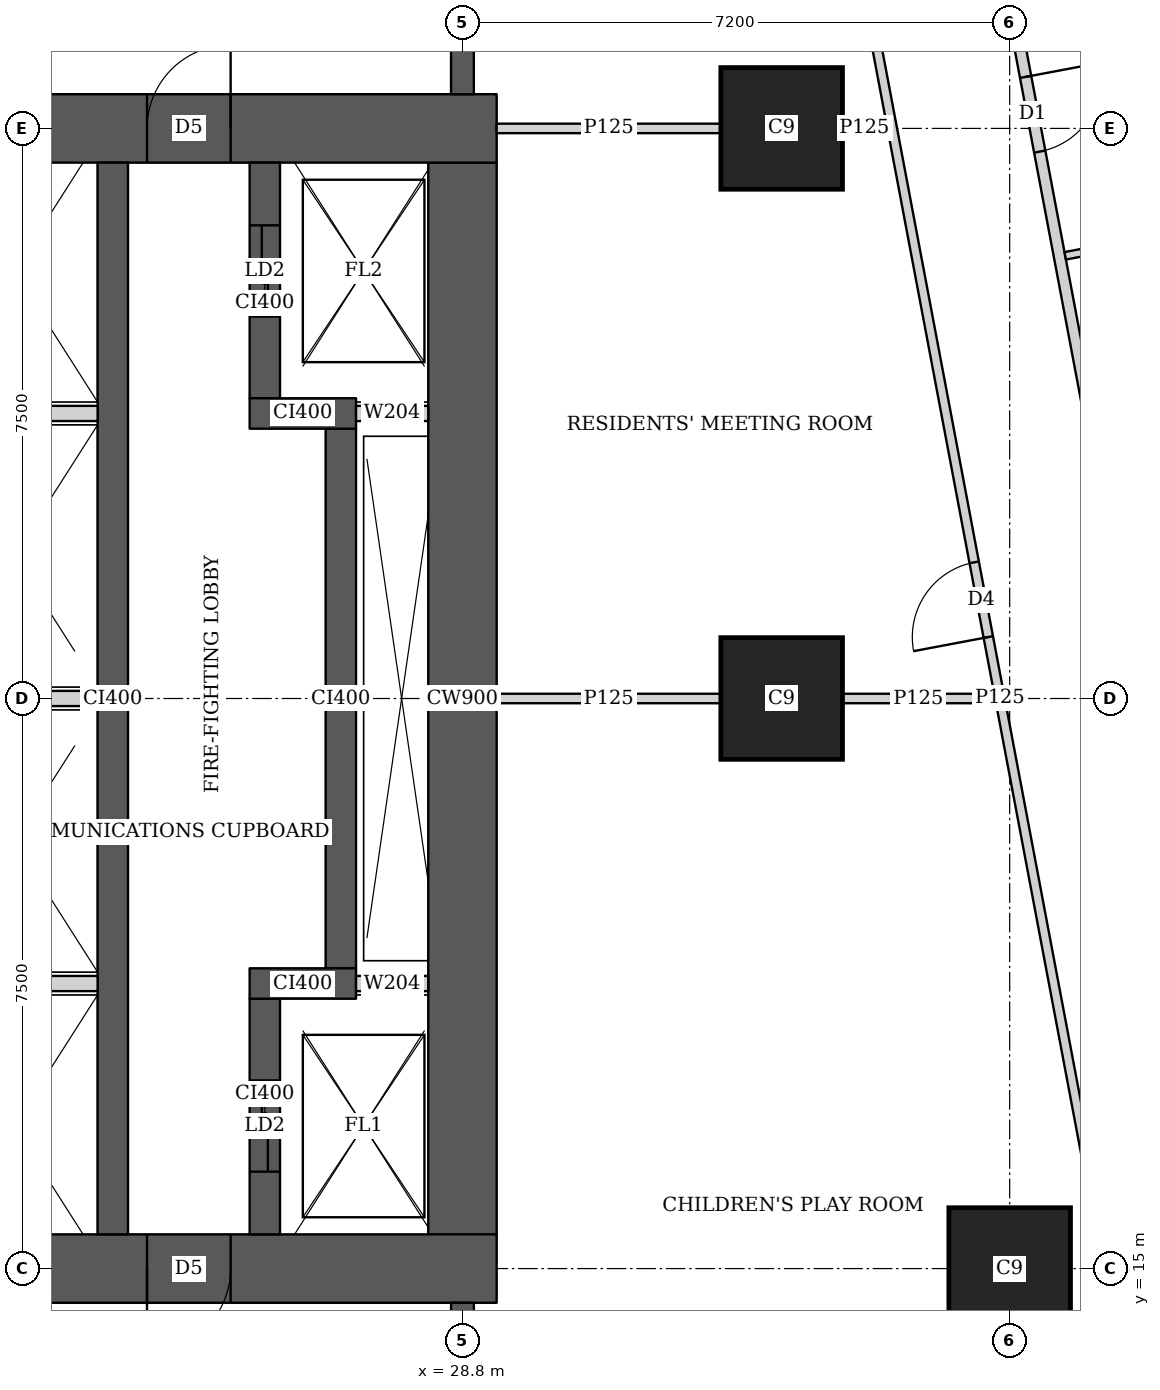
"""IFC4 building model, lengths in metres.
Left out: names, types, materials, properties, quantities, classifications, styles, units other than length and angle.
Written with IfcOpenShell. Run it as: python <this file> out.ifc"""

import sys

from ifc_helpers import new_model, si_unit, direction, frame, frame_2d, origin, origin_2d, place, context, subcontext, project, spatial, rectangle, extrude, element, fill, save


model = new_model("IFC4")
c1 = context("Model", 3, precision=1e-05, world=origin(), true_north=direction((0.0, 1.0)))
c2 = subcontext(c1, "Body", "Model", "MODEL_VIEW")
j1 = project(units=[si_unit("LENGTHUNIT", "METRE"), si_unit("PLANEANGLEUNIT", "RADIAN")], contexts=[c1])
p1 = place(None, origin())
s1 = spatial("IfcSite", under=j1, at=p1, CompositionType="ELEMENT")
p2 = place(p1, origin())
s2 = spatial("IfcBuilding", under=s1, at=p2, CompositionType="ELEMENT")
p3 = place(p2, frame((0.0, 0.0, 122.9)))
s3 = spatial("IfcBuildingStorey", under=s2, at=p3, CompositionType="ELEMENT", Elevation=122.9)
for number, where, z_axis, x_axis in (
    (1, (36.0, 15.0, 0.0), (0.0, 0.0, 1.0), (1.0, 0.0, 0.0)),
    (2, (33.0, 22.5, 0.0), (0.0, 0.0, 1.0), (1.0, 0.0, 0.0)),
    (3, (33.0, 30.0, 0.0), (0.0, 0.0, 1.0), (1.0, 0.0, 0.0)),
):
    element("IfcColumn", number, at=place(p3, frame(where, z_axis=z_axis, x_axis=x_axis)), inside=s3, PredefinedType="COLUMN", context=c2, shape_type="SweptSolid", body=[
        extrude(rectangle(XDim=1.6, YDim=1.6, at=origin_2d()), origin(), (0.0, 0.0, 1.0), 3.75),
    ])
p4 = place(p3, frame((13.95, 15.0, 0.0), z_axis=(0.0, 0.0, 1.0), x_axis=(1.0, 0.0, 0.0)))
e4 = element("IfcWall", 4, at=p4, inside=s3, PredefinedType="SHEAR", context=c2, shape_type="SweptSolid", body=[
    extrude(rectangle(XDim=15.3, YDim=0.9, at=frame_2d((7.65, 0.0))), origin(), (0.0, 0.0, 1.0), 3.75),
])
p5 = place(p4, frame((4.45, 0.0, 0.0)))
e5 = element("IfcOpeningElement", 5, at=p5, cuts=e4, PredefinedType="OPENING", context=c2, shape_type="SweptSolid", body=[
    extrude(rectangle(XDim=1.8, YDim=2.1, at=frame_2d((0.9, 1.05))), frame((0.0, 0.46, 0.0), z_axis=(0.0, -1.0, 0.0), x_axis=(1.0, 0.0, 0.0)), (0.0, 0.0, 1.0), 0.92),
])
p6 = place(p4, frame((10.7, 0.0, 0.0)))
e6 = element("IfcOpeningElement", 6, at=p6, cuts=e4, PredefinedType="OPENING", context=c2, shape_type="SweptSolid", body=[
    extrude(rectangle(XDim=1.1, YDim=2.1, at=frame_2d((0.55, 1.05))), frame((0.0, 0.46, 0.0), z_axis=(0.0, -1.0, 0.0), x_axis=(1.0, 0.0, 0.0)), (0.0, 0.0, 1.0), 0.92),
])
p7 = place(p3, frame((13.95, 30.0, 0.0), z_axis=(0.0, 0.0, 1.0), x_axis=(1.0, 0.0, 0.0)))
e7 = element("IfcWall", 7, at=p7, inside=s3, PredefinedType="SHEAR", context=c2, shape_type="SweptSolid", body=[
    extrude(rectangle(XDim=15.3, YDim=0.9, at=frame_2d((7.65, 0.0))), origin(), (0.0, 0.0, 1.0), 3.75),
])
p8 = place(p7, frame((4.45, 0.0, 0.0)))
e8 = element("IfcOpeningElement", 8, at=p8, cuts=e7, PredefinedType="OPENING", context=c2, shape_type="SweptSolid", body=[
    extrude(rectangle(XDim=1.8, YDim=2.1, at=frame_2d((0.9, 1.05))), frame((0.0, 0.46, 0.0), z_axis=(0.0, -1.0, 0.0), x_axis=(1.0, 0.0, 0.0)), (0.0, 0.0, 1.0), 0.92),
])
p9 = place(p7, frame((10.7, 0.0, 0.0)))
e9 = element("IfcOpeningElement", 9, at=p9, cuts=e7, PredefinedType="OPENING", context=c2, shape_type="SweptSolid", body=[
    extrude(rectangle(XDim=1.1, YDim=2.1, at=frame_2d((0.55, 1.05))), frame((0.0, 0.46, 0.0), z_axis=(0.0, -1.0, 0.0), x_axis=(1.0, 0.0, 0.0)), (0.0, 0.0, 1.0), 0.92),
])
p10 = place(p3, frame((28.8, 15.45, 0.0), z_axis=(0.0, 0.0, 1.0), x_axis=(0.0, 1.0, 0.0)))
e10 = element("IfcWall", 10, at=p10, inside=s3, PredefinedType="SHEAR", context=c2, shape_type="SweptSolid", body=[
    extrude(rectangle(XDim=14.1, YDim=0.9, at=frame_2d((7.05, 0.0))), origin(), (0.0, 0.0, 1.0), 3.75),
])
p11 = place(p3, frame((24.2, 15.45, 0.0), z_axis=(0.0, 0.0, 1.0), x_axis=(0.0, 1.0, 0.0)))
e11 = element("IfcWall", 11, at=p11, inside=s3, PredefinedType="SHEAR", context=c2, shape_type="SweptSolid", body=[
    extrude(rectangle(XDim=14.1, YDim=0.4, at=frame_2d((7.05, 0.0))), origin(), (0.0, 0.0, 1.0), 3.75),
])
p12 = place(p3, frame((26.2, 15.45, 0.0), z_axis=(0.0, 0.0, 1.0), x_axis=(0.0, 1.0, 0.0)))
e12 = element("IfcWall", 12, at=p12, inside=s3, PredefinedType="SHEAR", context=c2, shape_type="SweptSolid", body=[
    extrude(rectangle(XDim=3.1, YDim=0.4, at=frame_2d((1.55, 0.0))), origin(), (0.0, 0.0, 1.0), 3.75),
])
p13 = place(p12, frame((0.825, 0.0, 0.0)))
e13 = element("IfcOpeningElement", 13, at=p13, cuts=e12, PredefinedType="OPENING", context=c2, shape_type="SweptSolid", body=[
    extrude(rectangle(XDim=1.2, YDim=2.1, at=frame_2d((0.6, 1.05))), frame((0.0, 0.21, 0.0), z_axis=(0.0, -1.0, 0.0), x_axis=(1.0, 0.0, 0.0)), (0.0, 0.0, 1.0), 0.42),
])
p14 = place(p3, frame((26.0, 18.75, 0.0), z_axis=(0.0, 0.0, 1.0), x_axis=(1.0, 0.0, 0.0)))
e14 = element("IfcWall", 14, at=p14, inside=s3, PredefinedType="SHEAR", context=c2, shape_type="SweptSolid", body=[
    extrude(rectangle(XDim=1.4, YDim=0.4, at=frame_2d((0.7, 0.0))), origin(), (0.0, 0.0, 1.0), 3.75),
])
p15 = place(p3, frame((27.2, 18.95, 0.0), z_axis=(0.0, 0.0, 1.0), x_axis=(0.0, 1.0, 0.0)))
e15 = element("IfcWall", 15, at=p15, inside=s3, PredefinedType="SHEAR", context=c2, shape_type="SweptSolid", body=[
    extrude(rectangle(XDim=7.1, YDim=0.4, at=frame_2d((3.55, 0.0))), origin(), (0.0, 0.0, 1.0), 3.75),
])
p16 = place(p3, frame((26.0, 26.25, 0.0), z_axis=(0.0, 0.0, 1.0), x_axis=(1.0, 0.0, 0.0)))
e16 = element("IfcWall", 16, at=p16, inside=s3, PredefinedType="SHEAR", context=c2, shape_type="SweptSolid", body=[
    extrude(rectangle(XDim=1.4, YDim=0.4, at=frame_2d((0.7, 0.0))), origin(), (0.0, 0.0, 1.0), 3.75),
])
p17 = place(p3, frame((26.2, 26.45, 0.0), z_axis=(0.0, 0.0, 1.0), x_axis=(0.0, 1.0, 0.0)))
e17 = element("IfcWall", 17, at=p17, inside=s3, PredefinedType="SHEAR", context=c2, shape_type="SweptSolid", body=[
    extrude(rectangle(XDim=3.1, YDim=0.4, at=frame_2d((1.55, 0.0))), origin(), (0.0, 0.0, 1.0), 3.75),
])
p18 = place(p17, frame((1.075, 0.0, 0.0)))
e18 = element("IfcOpeningElement", 18, at=p18, cuts=e17, PredefinedType="OPENING", context=c2, shape_type="SweptSolid", body=[
    extrude(rectangle(XDim=1.2, YDim=2.1, at=frame_2d((0.6, 1.05))), frame((0.0, 0.21, 0.0), z_axis=(0.0, -1.0, 0.0), x_axis=(1.0, 0.0, 0.0)), (0.0, 0.0, 1.0), 0.42),
])
for number, where, z_axis, x_axis in (
    (19, (28.8, 10.35, 0.0), (0.0, 0.0, 1.0), (0.0, 1.0, 0.0)),
    (20, (28.8, 30.45, 0.0), (0.0, 0.0, 1.0), (0.0, 1.0, 0.0)),
):
    element("IfcWall", number, at=place(p3, frame(where, z_axis=z_axis, x_axis=x_axis)), inside=s3, PredefinedType="SHEAR", context=c2, shape_type="SweptSolid", body=[
        extrude(rectangle(XDim=4.2, YDim=0.3, at=frame_2d((2.1, 0.0))), origin(), (0.0, 0.0, 1.0), 3.75),
    ])
p19 = place(p3, frame((33.382, 45.65, 0.0), z_axis=(0.0, 0.0, 1.0), x_axis=(0.185593544777, -0.982626600565, 0.0)))
e21 = element("IfcWall", 21, at=p19, inside=s3, PredefinedType="SOLIDWALL", context=c2, shape_type="SweptSolid", body=[
    extrude(rectangle(XDim=47.118, YDim=0.15, at=frame_2d((23.559, 0.0))), origin(), (0.0, 0.0, 1.0), 2.2),
])
p20 = place(p19, frame((10.662, 0.0, 0.0)))
e22 = element("IfcOpeningElement", 22, at=p20, cuts=e21, PredefinedType="OPENING", context=c2, shape_type="SweptSolid", body=[
    extrude(rectangle(XDim=1.0, YDim=2.1, at=frame_2d((0.5, 1.05))), frame((0.0, 0.085, 0.0), z_axis=(0.0, -1.0, 0.0), x_axis=(1.0, 0.0, 0.0)), (0.0, 0.0, 1.0), 0.17),
])
p21 = place(p19, frame((15.237, 0.0, 0.0)))
e23 = element("IfcOpeningElement", 23, at=p21, cuts=e21, PredefinedType="OPENING", context=c2, shape_type="SweptSolid", body=[
    extrude(rectangle(XDim=1.0, YDim=2.1, at=frame_2d((0.5, 1.05))), frame((0.0, 0.085, 0.0), z_axis=(0.0, -1.0, 0.0), x_axis=(1.0, 0.0, 0.0)), (0.0, 0.0, 1.0), 0.17),
])
p22 = place(p19, frame((22.87, 0.0, 0.0)))
e24 = element("IfcOpeningElement", 24, at=p22, cuts=e21, PredefinedType="OPENING", context=c2, shape_type="SweptSolid", body=[
    extrude(rectangle(XDim=1.0, YDim=2.1, at=frame_2d((0.5, 1.05))), frame((0.0, 0.085, 0.0), z_axis=(0.0, -1.0, 0.0), x_axis=(1.0, 0.0, 0.0)), (0.0, 0.0, 1.0), 0.17),
])
p23 = place(p19, frame((33.833, 0.0, 0.0)))
e25 = element("IfcOpeningElement", 25, at=p23, cuts=e21, PredefinedType="OPENING", context=c2, shape_type="SweptSolid", body=[
    extrude(rectangle(XDim=1.0, YDim=2.1, at=frame_2d((0.5, 1.05))), frame((0.0, 0.085, 0.0), z_axis=(0.0, -1.0, 0.0), x_axis=(1.0, 0.0, 0.0)), (0.0, 0.0, 1.0), 0.17),
])
p24 = place(p3, frame((39.948, 28.933, 0.0), z_axis=(0.0, 0.0, 1.0), x_axis=(-0.982542259571, -0.186039533857, 0.0)))
e26 = element("IfcWall", 26, at=p24, inside=s3, PredefinedType="PARTITIONING", context=c2, shape_type="SweptSolid", body=[
    extrude(rectangle(XDim=3.274, YDim=0.1, at=frame_2d((1.637, 0.0))), origin(), (0.0, 0.0, 1.0), 3.5),
])
p25 = place(p3, frame((38.202, 10.163, 0.0), z_axis=(0.0, 0.0, 1.0), x_axis=(-0.185610321132, 0.982623431783, 0.0)))
e27 = element("IfcWall", 27, at=p25, inside=s3, PredefinedType="PARTITIONING", context=c2, shape_type="SweptSolid", body=[
    extrude(rectangle(XDim=25.111, YDim=0.125, at=frame_2d((12.556, 0.0))), origin(), (0.0, 0.0, 1.0), 2.5),
])
p26 = place(p25, frame((0.708, 0.0, 0.0)))
e28 = element("IfcOpeningElement", 28, at=p26, cuts=e27, PredefinedType="OPENING", context=c2, shape_type="SweptSolid", body=[
    extrude(rectangle(XDim=1.0, YDim=2.1, at=frame_2d((0.5, 1.05))), frame((0.0, 0.073, 0.0), z_axis=(0.0, -1.0, 0.0), x_axis=(1.0, 0.0, 0.0)), (0.0, 0.0, 1.0), 0.145),
])
p27 = place(p25, frame((13.378, 0.0, 0.0)))
e29 = element("IfcOpeningElement", 29, at=p27, cuts=e27, PredefinedType="OPENING", context=c2, shape_type="SweptSolid", body=[
    extrude(rectangle(XDim=1.0, YDim=2.1, at=frame_2d((0.5, 1.05))), frame((0.0, 0.073, 0.0), z_axis=(0.0, -1.0, 0.0), x_axis=(1.0, 0.0, 0.0)), (0.0, 0.0, 1.0), 0.145),
])
p28 = place(p25, frame((21.25, 0.0, 0.0)))
e30 = element("IfcOpeningElement", 30, at=p28, cuts=e27, PredefinedType="OPENING", context=c2, shape_type="SweptSolid", body=[
    extrude(rectangle(XDim=1.0, YDim=2.1, at=frame_2d((0.5, 1.05))), frame((0.0, 0.073, 0.0), z_axis=(0.0, -1.0, 0.0), x_axis=(1.0, 0.0, 0.0)), (0.0, 0.0, 1.0), 0.145),
])
p29 = place(p25, frame((23.453, 0.0, 0.0)))
e31 = element("IfcOpeningElement", 31, at=p29, cuts=e27, PredefinedType="OPENING", context=c2, shape_type="SweptSolid", body=[
    extrude(rectangle(XDim=1.0, YDim=2.1, at=frame_2d((0.5, 1.05))), frame((0.0, 0.073, 0.0), z_axis=(0.0, -1.0, 0.0), x_axis=(1.0, 0.0, 0.0)), (0.0, 0.0, 1.0), 0.145),
])
p30 = place(p3, frame((29.25, 22.5, 0.0), z_axis=(0.0, 0.0, 1.0), x_axis=(1.0, 0.0, 0.0)))
e32 = element("IfcWall", 32, at=p30, inside=s3, PredefinedType="PARTITIONING", context=c2, shape_type="SweptSolid", body=[
    extrude(rectangle(XDim=2.949, YDim=0.125, at=frame_2d((1.475, 0.0))), origin(), (0.0, 0.0, 1.0), 3.5),
])
p31 = place(p3, frame((33.801, 22.5, 0.0), z_axis=(0.0, 0.0, 1.0), x_axis=(1.0, 0.0, 0.0)))
e33 = element("IfcWall", 33, at=p31, inside=s3, PredefinedType="PARTITIONING", context=c2, shape_type="SweptSolid", body=[
    extrude(rectangle(XDim=1.995, YDim=0.125, at=frame_2d((0.998, 0.0))), origin(), (0.0, 0.0, 1.0), 2.5),
])
p32 = place(p3, frame((29.25, 30.0, 0.0), z_axis=(0.0, 0.0, 1.0), x_axis=(1.0, 0.0, 0.0)))
e34 = element("IfcWall", 34, at=p32, inside=s3, PredefinedType="PARTITIONING", context=c2, shape_type="SweptSolid", body=[
    extrude(rectangle(XDim=2.949, YDim=0.125, at=frame_2d((1.475, 0.0))), origin(), (0.0, 0.0, 1.0), 3.5),
])
p33 = place(p3, frame((33.801, 30.0, 0.0), z_axis=(0.0, 0.0, 1.0), x_axis=(1.0, 0.0, 0.0)))
e35 = element("IfcWall", 35, at=p33, inside=s3, PredefinedType="PARTITIONING", context=c2, shape_type="SweptSolid", body=[
    extrude(rectangle(XDim=0.578, YDim=0.125, at=frame_2d((0.289, 0.0))), origin(), (0.0, 0.0, 1.0), 2.5),
])
for number, where, z_axis, x_axis in (
    (36, (21.8, 18.75, 0.0), (0.0, 0.0, 1.0), (1.0, 0.0, 0.0)),
    (37, (21.8, 22.5, 0.0), (0.0, 0.0, 1.0), (1.0, 0.0, 0.0)),
    (38, (21.8, 26.25, 0.0), (0.0, 0.0, 1.0), (1.0, 0.0, 0.0)),
):
    element("IfcWall", number, at=place(p3, frame(where, z_axis=z_axis, x_axis=x_axis)), inside=s3, PredefinedType="SOLIDWALL", context=c2, shape_type="SweptSolid", body=[
        extrude(rectangle(XDim=2.2, YDim=0.2, at=frame_2d((1.1, 0.0))), origin(), (0.0, 0.0, 1.0), 3.5),
    ])
for number, where, z_axis, x_axis in (
    (39, (27.4, 18.75, 0.0), (0.0, 0.0, 1.0), (1.0, 0.0, 0.0)),
    (40, (27.4, 26.25, 0.0), (0.0, 0.0, 1.0), (1.0, 0.0, 0.0)),
):
    element("IfcWall", number, at=place(p3, frame(where, z_axis=z_axis, x_axis=x_axis)), inside=s3, PredefinedType="SOLIDWALL", context=c2, shape_type="SweptSolid", body=[
        extrude(rectangle(XDim=0.95, YDim=0.2, at=frame_2d((0.475, 0.0))), origin(), (0.0, 0.0, 1.0), 3.5),
    ])
p34 = place(p21, origin())
e41 = element("IfcDoor", 41, at=p34, inside=s3, OperationType="SINGLE_SWING_LEFT", PredefinedType="DOOR", context=c2, shape_type="SweptSolid", body=[
    extrude(rectangle(XDim=1.0, YDim=2.1, at=frame_2d((0.5, 1.05))), frame((0.0, 0.025, 0.0), z_axis=(0.0, -1.0, 0.0), x_axis=(1.0, 0.0, 0.0)), (0.0, 0.0, 1.0), 0.05),
])
fill(e23, e41)
p35 = place(p27, origin())
e42 = element("IfcDoor", 42, at=p35, inside=s3, OperationType="SINGLE_SWING_LEFT", PredefinedType="DOOR", context=c2, shape_type="SweptSolid", body=[
    extrude(rectangle(XDim=1.0, YDim=2.1, at=frame_2d((0.5, 1.05))), frame((0.0, 0.025, 0.0), z_axis=(0.0, -1.0, 0.0), x_axis=(1.0, 0.0, 0.0)), (0.0, 0.0, 1.0), 0.05),
])
fill(e29, e42)
p36 = place(p6, origin())
e43 = element("IfcDoor", 43, at=p36, inside=s3, OperationType="SINGLE_SWING_RIGHT", PredefinedType="DOOR", context=c2, shape_type="SweptSolid", body=[
    extrude(rectangle(XDim=1.1, YDim=2.1, at=frame_2d((0.55, 1.05))), frame((0.0, 0.025, 0.0), z_axis=(0.0, -1.0, 0.0), x_axis=(1.0, 0.0, 0.0)), (0.0, 0.0, 1.0), 0.05),
])
fill(e6, e43)
p37 = place(p9, origin())
e44 = element("IfcDoor", 44, at=p37, inside=s3, OperationType="SINGLE_SWING_RIGHT", PredefinedType="DOOR", context=c2, shape_type="SweptSolid", body=[
    extrude(rectangle(XDim=1.1, YDim=2.1, at=frame_2d((0.55, 1.05))), frame((0.0, 0.025, 0.0), z_axis=(0.0, -1.0, 0.0), x_axis=(1.0, 0.0, 0.0)), (0.0, 0.0, 1.0), 0.05),
])
fill(e9, e44)
p38 = place(p13, origin())
e45 = element("IfcDoor", 45, at=p38, inside=s3, OperationType="DOUBLE_DOOR_SLIDING", PredefinedType="DOOR", context=c2, shape_type="SweptSolid", body=[
    extrude(rectangle(XDim=1.2, YDim=2.1, at=frame_2d((0.6, 1.05))), frame((0.0, 0.025, 0.0), z_axis=(0.0, -1.0, 0.0), x_axis=(1.0, 0.0, 0.0)), (0.0, 0.0, 1.0), 0.05),
])
fill(e13, e45)
p39 = place(p18, origin())
e46 = element("IfcDoor", 46, at=p39, inside=s3, OperationType="DOUBLE_DOOR_SLIDING", PredefinedType="DOOR", context=c2, shape_type="SweptSolid", body=[
    extrude(rectangle(XDim=1.2, YDim=2.1, at=frame_2d((0.6, 1.05))), frame((0.0, 0.025, 0.0), z_axis=(0.0, -1.0, 0.0), x_axis=(1.0, 0.0, 0.0)), (0.0, 0.0, 1.0), 0.05),
])
fill(e18, e46)
save(model, sys.argv[1])
